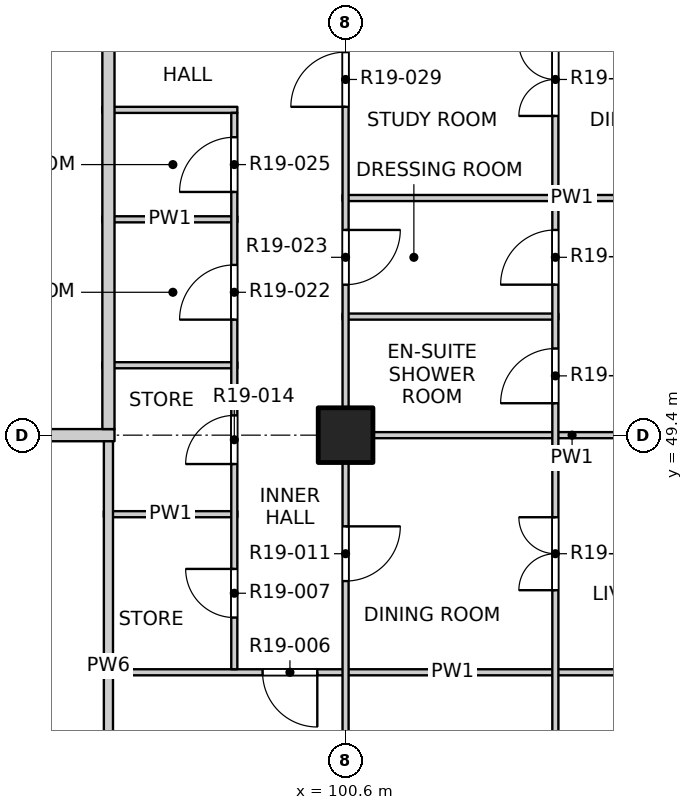
"""IFC4 building model, lengths in metres.
Left out: names, types, materials, properties, quantities, classifications, styles, units other than length and angle.
Written with IfcOpenShell. Run it as: python <this file> out.ifc"""

import sys

from ifc_helpers import new_model, si_unit, direction, frame, frame_2d, origin, origin_2d, place, context, subcontext, project, spatial, rectangle, extrude, element, fill, save


model = new_model("IFC4")
c1 = context("Model", 3, precision=1e-05, world=origin(), true_north=direction((0.0, 1.0)))
c2 = subcontext(c1, "Body", "Model", "MODEL_VIEW")
j1 = project(units=[si_unit("LENGTHUNIT", "METRE"), si_unit("PLANEANGLEUNIT", "RADIAN")], contexts=[c1])
p1 = place(None, origin())
s1 = spatial("IfcSite", under=j1, at=p1, CompositionType="ELEMENT")
p2 = place(p1, origin())
s2 = spatial("IfcBuilding", under=s1, at=p2, CompositionType="ELEMENT")
p3 = place(p2, frame((0.0, 0.0, 197.3)))
s3 = spatial("IfcBuildingStorey", under=s2, at=p3, CompositionType="ELEMENT", Elevation=197.3)
p4 = place(p3, frame((100.6, 49.4, -0.3), z_axis=(0.0, 0.0, 1.0), x_axis=(1.0, 0.0, 0.0)))
e1 = element("IfcColumn", 1, at=p4, inside=s3, PredefinedType="COLUMN", context=c2, shape_type="SweptSolid", body=[
    extrude(rectangle(XDim=0.9, YDim=0.9, at=origin_2d()), origin(), (0.0, 0.0, 1.0), 3.45),
])
p5 = place(p3, frame((96.625, 45.5, 0.0), z_axis=(0.0, 0.0, 1.0), x_axis=(1.0, 0.0, 0.0)))
e2 = element("IfcWall", 2, at=p5, inside=s3, PredefinedType="PARTITIONING", context=c2, shape_type="SweptSolid", body=[
    extrude(rectangle(XDim=11.475, YDim=0.1, at=frame_2d((5.738, 0.0))), origin(), (0.0, 0.0, 1.0), 3.15),
])
p6 = place(p5, frame((2.61, 0.0, 0.0)))
e3 = element("IfcOpeningElement", 3, at=p6, cuts=e2, PredefinedType="OPENING", context=c2, shape_type="SweptSolid", body=[
    extrude(rectangle(XDim=0.9, YDim=2.1, at=frame_2d((0.45, 1.05))), frame((0.0, 0.06, 0.0), z_axis=(0.0, -1.0, 0.0), x_axis=(1.0, 0.0, 0.0)), (0.0, 0.0, 1.0), 0.12),
])
p7 = place(p3, frame((96.625, 48.1, 0.0), z_axis=(0.0, 0.0, 1.0), x_axis=(1.0, 0.0, 0.0)))
e4 = element("IfcWall", 4, at=p7, inside=s3, PredefinedType="PARTITIONING", context=c2, shape_type="SweptSolid", body=[
    extrude(rectangle(XDim=2.195, YDim=0.1, at=frame_2d((1.098, 0.0))), origin(), (0.0, 0.0, 1.0), 3.15),
])
p8 = place(p3, frame((73.2, 49.4, 0.0), z_axis=(0.0, 0.0, 1.0), x_axis=(1.0, 0.0, 0.0)))
e5 = element("IfcWall", 5, at=p8, inside=s3, PredefinedType="PARTITIONING", context=c2, shape_type="SweptSolid", body=[
    extrude(rectangle(XDim=23.6, YDim=0.2, at=frame_2d((11.8, 0.0))), origin(), (0.0, 0.0, 1.0), 3.15),
])
p9 = place(p8, frame((2.25, 0.0, 0.0)))
e6 = element("IfcOpeningElement", 6, at=p9, cuts=e5, PredefinedType="OPENING", context=c2, shape_type="SweptSolid", body=[
    extrude(rectangle(XDim=1.2, YDim=2.1, at=frame_2d((0.6, 1.05))), frame((0.0, 0.11, 0.0), z_axis=(0.0, -1.0, 0.0), x_axis=(1.0, 0.0, 0.0)), (0.0, 0.0, 1.0), 0.22),
])
p10 = place(p8, frame((12.375, 0.0, 0.0)))
e7 = element("IfcOpeningElement", 7, at=p10, cuts=e5, PredefinedType="OPENING", context=c2, shape_type="SweptSolid", body=[
    extrude(rectangle(XDim=1.2, YDim=2.1, at=frame_2d((0.6, 1.05))), frame((0.0, 0.11, 0.0), z_axis=(0.0, -1.0, 0.0), x_axis=(1.0, 0.0, 0.0)), (0.0, 0.0, 1.0), 0.22),
])
p11 = place(p8, frame((20.15, 0.0, 0.0)))
e8 = element("IfcOpeningElement", 8, at=p11, cuts=e5, PredefinedType="OPENING", context=c2, shape_type="SweptSolid", body=[
    extrude(rectangle(XDim=1.2, YDim=2.1, at=frame_2d((0.6, 1.05))), frame((0.0, 0.11, 0.0), z_axis=(0.0, -1.0, 0.0), x_axis=(1.0, 0.0, 0.0)), (0.0, 0.0, 1.0), 0.22),
])
p12 = place(p3, frame((100.55, 49.4, 0.0), z_axis=(0.0, 0.0, 1.0), x_axis=(1.0, 0.0, 0.0)))
e9 = element("IfcWall", 9, at=p12, inside=s3, PredefinedType="PARTITIONING", context=c2, shape_type="SweptSolid", body=[
    extrude(rectangle(XDim=7.55, YDim=0.1, at=frame_2d((3.775, 0.0))), origin(), (0.0, 0.0, 1.0), 3.15),
])
p13 = place(p3, frame((96.6, 50.55, 0.0), z_axis=(0.0, 0.0, 1.0), x_axis=(1.0, 0.0, 0.0)))
e10 = element("IfcWall", 10, at=p13, inside=s3, PredefinedType="PARTITIONING", context=c2, shape_type="SweptSolid", body=[
    extrude(rectangle(XDim=2.22, YDim=0.1, at=frame_2d((1.11, 0.0))), origin(), (0.0, 0.0, 1.0), 3.15),
])
p14 = place(p3, frame((100.55, 51.35, 0.0), z_axis=(0.0, 0.0, 1.0), x_axis=(1.0, 0.0, 0.0)))
e11 = element("IfcWall", 11, at=p14, inside=s3, PredefinedType="PARTITIONING", context=c2, shape_type="SweptSolid", body=[
    extrude(rectangle(XDim=3.55, YDim=0.1, at=frame_2d((1.775, 0.0))), origin(), (0.0, 0.0, 1.0), 3.15),
])
p15 = place(p3, frame((96.6, 52.95, 0.0), z_axis=(0.0, 0.0, 1.0), x_axis=(1.0, 0.0, 0.0)))
e12 = element("IfcWall", 12, at=p15, inside=s3, PredefinedType="PARTITIONING", context=c2, shape_type="SweptSolid", body=[
    extrude(rectangle(XDim=2.22, YDim=0.1, at=frame_2d((1.11, 0.0))), origin(), (0.0, 0.0, 1.0), 3.15),
])
p16 = place(p3, frame((100.55, 53.3, 0.0), z_axis=(0.0, 0.0, 1.0), x_axis=(1.0, 0.0, 0.0)))
e13 = element("IfcWall", 13, at=p16, inside=s3, PredefinedType="PARTITIONING", context=c2, shape_type="SweptSolid", body=[
    extrude(rectangle(XDim=7.55, YDim=0.1, at=frame_2d((3.775, 0.0))), origin(), (0.0, 0.0, 1.0), 3.15),
])
p17 = place(p3, frame((96.6, 54.75, 0.0), z_axis=(0.0, 0.0, 1.0), x_axis=(1.0, 0.0, 0.0)))
e14 = element("IfcWall", 14, at=p17, inside=s3, PredefinedType="PARTITIONING", context=c2, shape_type="SweptSolid", body=[
    extrude(rectangle(XDim=2.22, YDim=0.1, at=frame_2d((1.11, 0.0))), origin(), (0.0, 0.0, 1.0), 3.15),
])
p18 = place(p3, frame((96.7, 41.9, 0.0), z_axis=(0.0, 0.0, 1.0), x_axis=(0.0, 1.0, 0.0)))
e15 = element("IfcWall", 15, at=p18, inside=s3, PredefinedType="PARTITIONING", context=c2, shape_type="SweptSolid", body=[
    extrude(rectangle(XDim=7.4, YDim=0.15, at=frame_2d((3.7, 0.0))), origin(), (0.0, 0.0, 1.0), 3.15),
])
p19 = place(p3, frame((96.7, 49.5, 0.0), z_axis=(0.0, 0.0, 1.0), x_axis=(0.0, 1.0, 0.0)))
e16 = element("IfcWall", 16, at=p19, inside=s3, PredefinedType="PARTITIONING", context=c2, shape_type="SweptSolid", body=[
    extrude(rectangle(XDim=34.9, YDim=0.2, at=frame_2d((17.45, 0.0))), origin(), (0.0, 0.0, 1.0), 3.15),
])
p20 = place(p19, frame((6.525, 0.0, 0.0)))
e17 = element("IfcOpeningElement", 17, at=p20, cuts=e16, PredefinedType="OPENING", context=c2, shape_type="SweptSolid", body=[
    extrude(rectangle(XDim=1.0, YDim=2.1, at=frame_2d((0.5, 1.05))), frame((0.0, 0.11, 0.0), z_axis=(0.0, -1.0, 0.0), x_axis=(1.0, 0.0, 0.0)), (0.0, 0.0, 1.0), 0.22),
])
p21 = place(p19, frame((14.275, 0.0, 0.0)))
e18 = element("IfcOpeningElement", 18, at=p21, cuts=e16, PredefinedType="OPENING", context=c2, shape_type="SweptSolid", body=[
    extrude(rectangle(XDim=1.0, YDim=2.1, at=frame_2d((0.5, 1.05))), frame((0.0, 0.11, 0.0), z_axis=(0.0, -1.0, 0.0), x_axis=(1.0, 0.0, 0.0)), (0.0, 0.0, 1.0), 0.22),
])
p22 = place(p19, frame((25.075, 0.0, 0.0)))
e19 = element("IfcOpeningElement", 19, at=p22, cuts=e16, PredefinedType="OPENING", context=c2, shape_type="SweptSolid", body=[
    extrude(rectangle(XDim=1.0, YDim=2.1, at=frame_2d((0.5, 1.05))), frame((0.0, 0.11, 0.0), z_axis=(0.0, -1.0, 0.0), x_axis=(1.0, 0.0, 0.0)), (0.0, 0.0, 1.0), 0.22),
])
p23 = place(p19, frame((30.475, 0.0, 0.0)))
e20 = element("IfcOpeningElement", 20, at=p23, cuts=e16, PredefinedType="OPENING", context=c2, shape_type="SweptSolid", body=[
    extrude(rectangle(XDim=1.0, YDim=2.1, at=frame_2d((0.5, 1.05))), frame((0.0, 0.11, 0.0), z_axis=(0.0, -1.0, 0.0), x_axis=(1.0, 0.0, 0.0)), (0.0, 0.0, 1.0), 0.22),
])
p24 = place(p3, frame((98.77, 45.55, 0.0), z_axis=(0.0, 0.0, 1.0), x_axis=(0.0, 1.0, 0.0)))
e21 = element("IfcWall", 21, at=p24, inside=s3, PredefinedType="PARTITIONING", context=c2, shape_type="SweptSolid", body=[
    extrude(rectangle(XDim=9.15, YDim=0.1, at=frame_2d((4.575, 0.0))), origin(), (0.0, 0.0, 1.0), 3.15),
])
p25 = place(p24, frame((0.85, 0.0, 0.0)))
e22 = element("IfcOpeningElement", 22, at=p25, cuts=e21, PredefinedType="OPENING", context=c2, shape_type="SweptSolid", body=[
    extrude(rectangle(XDim=0.8, YDim=2.1, at=frame_2d((0.4, 1.05))), frame((0.0, 0.06, 0.0), z_axis=(0.0, -1.0, 0.0), x_axis=(1.0, 0.0, 0.0)), (0.0, 0.0, 1.0), 0.12),
])
p26 = place(p24, frame((3.375, 0.0, 0.0)))
e23 = element("IfcOpeningElement", 23, at=p26, cuts=e21, PredefinedType="OPENING", context=c2, shape_type="SweptSolid", body=[
    extrude(rectangle(XDim=0.8, YDim=2.1, at=frame_2d((0.4, 1.05))), frame((0.0, 0.06, 0.0), z_axis=(0.0, -1.0, 0.0), x_axis=(1.0, 0.0, 0.0)), (0.0, 0.0, 1.0), 0.12),
])
p27 = place(p24, frame((5.75, 0.0, 0.0)))
e24 = element("IfcOpeningElement", 24, at=p27, cuts=e21, PredefinedType="OPENING", context=c2, shape_type="SweptSolid", body=[
    extrude(rectangle(XDim=0.9, YDim=2.1, at=frame_2d((0.45, 1.05))), frame((0.0, 0.06, 0.0), z_axis=(0.0, -1.0, 0.0), x_axis=(1.0, 0.0, 0.0)), (0.0, 0.0, 1.0), 0.12),
])
p28 = place(p24, frame((7.85, 0.0, 0.0)))
e25 = element("IfcOpeningElement", 25, at=p28, cuts=e21, PredefinedType="OPENING", context=c2, shape_type="SweptSolid", body=[
    extrude(rectangle(XDim=0.9, YDim=2.1, at=frame_2d((0.45, 1.05))), frame((0.0, 0.06, 0.0), z_axis=(0.0, -1.0, 0.0), x_axis=(1.0, 0.0, 0.0)), (0.0, 0.0, 1.0), 0.12),
])
p29 = place(p3, frame((100.6, 41.9, 0.0), z_axis=(0.0, 0.0, 1.0), x_axis=(0.0, 1.0, 0.0)))
e26 = element("IfcWall", 26, at=p29, inside=s3, PredefinedType="PARTITIONING", context=c2, shape_type="SweptSolid", body=[
    extrude(rectangle(XDim=46.2, YDim=0.1, at=frame_2d((23.1, 0.0))), origin(), (0.0, 0.0, 1.0), 3.15),
])
p30 = place(p29, frame((1.2, 0.0, 0.0)))
e27 = element("IfcOpeningElement", 27, at=p30, cuts=e26, PredefinedType="OPENING", context=c2, shape_type="SweptSolid", body=[
    extrude(rectangle(XDim=0.9, YDim=2.1, at=frame_2d((0.45, 1.05))), frame((0.0, 0.06, 0.0), z_axis=(0.0, -1.0, 0.0), x_axis=(1.0, 0.0, 0.0)), (0.0, 0.0, 1.0), 0.12),
])
p31 = place(p29, frame((5.1, 0.0, 0.0)))
e28 = element("IfcOpeningElement", 28, at=p31, cuts=e26, PredefinedType="OPENING", context=c2, shape_type="SweptSolid", body=[
    extrude(rectangle(XDim=0.9, YDim=2.1, at=frame_2d((0.45, 1.05))), frame((0.0, 0.06, 0.0), z_axis=(0.0, -1.0, 0.0), x_axis=(1.0, 0.0, 0.0)), (0.0, 0.0, 1.0), 0.12),
])
p32 = place(p29, frame((9.975, 0.0, 0.0)))
e29 = element("IfcOpeningElement", 29, at=p32, cuts=e26, PredefinedType="OPENING", context=c2, shape_type="SweptSolid", body=[
    extrude(rectangle(XDim=0.9, YDim=2.1, at=frame_2d((0.45, 1.05))), frame((0.0, 0.06, 0.0), z_axis=(0.0, -1.0, 0.0), x_axis=(1.0, 0.0, 0.0)), (0.0, 0.0, 1.0), 0.12),
])
p33 = place(p29, frame((12.9, 0.0, 0.0)))
e30 = element("IfcOpeningElement", 30, at=p33, cuts=e26, PredefinedType="OPENING", context=c2, shape_type="SweptSolid", body=[
    extrude(rectangle(XDim=0.9, YDim=2.1, at=frame_2d((0.45, 1.05))), frame((0.0, 0.06, 0.0), z_axis=(0.0, -1.0, 0.0), x_axis=(1.0, 0.0, 0.0)), (0.0, 0.0, 1.0), 0.12),
])
p34 = place(p29, frame((17.775, 0.0, 0.0)))
e31 = element("IfcOpeningElement", 31, at=p34, cuts=e26, PredefinedType="OPENING", context=c2, shape_type="SweptSolid", body=[
    extrude(rectangle(XDim=0.9, YDim=2.1, at=frame_2d((0.45, 1.05))), frame((0.0, 0.06, 0.0), z_axis=(0.0, -1.0, 0.0), x_axis=(1.0, 0.0, 0.0)), (0.0, 0.0, 1.0), 0.12),
])
p35 = place(p29, frame((20.7, 0.0, 0.0)))
e32 = element("IfcOpeningElement", 32, at=p35, cuts=e26, PredefinedType="OPENING", context=c2, shape_type="SweptSolid", body=[
    extrude(rectangle(XDim=0.9, YDim=2.1, at=frame_2d((0.45, 1.05))), frame((0.0, 0.06, 0.0), z_axis=(0.0, -1.0, 0.0), x_axis=(1.0, 0.0, 0.0)), (0.0, 0.0, 1.0), 0.12),
])
p36 = place(p29, frame((25.575, 0.0, 0.0)))
e33 = element("IfcOpeningElement", 33, at=p36, cuts=e26, PredefinedType="OPENING", context=c2, shape_type="SweptSolid", body=[
    extrude(rectangle(XDim=0.9, YDim=2.1, at=frame_2d((0.45, 1.05))), frame((0.0, 0.06, 0.0), z_axis=(0.0, -1.0, 0.0), x_axis=(1.0, 0.0, 0.0)), (0.0, 0.0, 1.0), 0.12),
])
p37 = place(p29, frame((28.5, 0.0, 0.0)))
e34 = element("IfcOpeningElement", 34, at=p37, cuts=e26, PredefinedType="OPENING", context=c2, shape_type="SweptSolid", body=[
    extrude(rectangle(XDim=0.9, YDim=2.1, at=frame_2d((0.45, 1.05))), frame((0.0, 0.06, 0.0), z_axis=(0.0, -1.0, 0.0), x_axis=(1.0, 0.0, 0.0)), (0.0, 0.0, 1.0), 0.12),
])
p38 = place(p29, frame((33.375, 0.0, 0.0)))
e35 = element("IfcOpeningElement", 35, at=p38, cuts=e26, PredefinedType="OPENING", context=c2, shape_type="SweptSolid", body=[
    extrude(rectangle(XDim=0.9, YDim=2.1, at=frame_2d((0.45, 1.05))), frame((0.0, 0.06, 0.0), z_axis=(0.0, -1.0, 0.0), x_axis=(1.0, 0.0, 0.0)), (0.0, 0.0, 1.0), 0.12),
])
p39 = place(p29, frame((37.225, 0.0, 0.0)))
e36 = element("IfcOpeningElement", 36, at=p39, cuts=e26, PredefinedType="OPENING", context=c2, shape_type="SweptSolid", body=[
    extrude(rectangle(XDim=0.9, YDim=2.1, at=frame_2d((0.45, 1.05))), frame((0.0, 0.06, 0.0), z_axis=(0.0, -1.0, 0.0), x_axis=(1.0, 0.0, 0.0)), (0.0, 0.0, 1.0), 0.12),
])
p40 = place(p29, frame((41.175, 0.0, 0.0)))
e37 = element("IfcOpeningElement", 37, at=p40, cuts=e26, PredefinedType="OPENING", context=c2, shape_type="SweptSolid", body=[
    extrude(rectangle(XDim=0.9, YDim=2.1, at=frame_2d((0.45, 1.05))), frame((0.0, 0.06, 0.0), z_axis=(0.0, -1.0, 0.0), x_axis=(1.0, 0.0, 0.0)), (0.0, 0.0, 1.0), 0.12),
])
p41 = place(p29, frame((44.1, 0.0, 0.0)))
e38 = element("IfcOpeningElement", 38, at=p41, cuts=e26, PredefinedType="OPENING", context=c2, shape_type="SweptSolid", body=[
    extrude(rectangle(XDim=0.9, YDim=2.1, at=frame_2d((0.45, 1.05))), frame((0.0, 0.06, 0.0), z_axis=(0.0, -1.0, 0.0), x_axis=(1.0, 0.0, 0.0)), (0.0, 0.0, 1.0), 0.12),
])
p42 = place(p3, frame((104.05, 41.9, 0.0), z_axis=(0.0, 0.0, 1.0), x_axis=(0.0, 1.0, 0.0)))
e39 = element("IfcWall", 39, at=p42, inside=s3, PredefinedType="PARTITIONING", context=c2, shape_type="SweptSolid", body=[
    extrude(rectangle(XDim=26.9, YDim=0.1, at=frame_2d((13.45, 0.0))), origin(), (0.0, 0.0, 1.0), 3.15),
])
p43 = place(p42, frame((1.05, 0.0, 0.0)))
e40 = element("IfcOpeningElement", 40, at=p43, cuts=e39, PredefinedType="OPENING", context=c2, shape_type="SweptSolid", body=[
    extrude(rectangle(XDim=1.2, YDim=2.1, at=frame_2d((0.6, 1.05))), frame((0.0, 0.06, 0.0), z_axis=(0.0, -1.0, 0.0), x_axis=(1.0, 0.0, 0.0)), (0.0, 0.0, 1.0), 0.12),
])
p44 = place(p42, frame((4.95, 0.0, 0.0)))
e41 = element("IfcOpeningElement", 41, at=p44, cuts=e39, PredefinedType="OPENING", context=c2, shape_type="SweptSolid", body=[
    extrude(rectangle(XDim=1.2, YDim=2.1, at=frame_2d((0.6, 1.05))), frame((0.0, 0.06, 0.0), z_axis=(0.0, -1.0, 0.0), x_axis=(1.0, 0.0, 0.0)), (0.0, 0.0, 1.0), 0.12),
])
p45 = place(p42, frame((8.025, 0.0, 0.0)))
e42 = element("IfcOpeningElement", 42, at=p45, cuts=e39, PredefinedType="OPENING", context=c2, shape_type="SweptSolid", body=[
    extrude(rectangle(XDim=0.9, YDim=2.1, at=frame_2d((0.45, 1.05))), frame((0.0, 0.06, 0.0), z_axis=(0.0, -1.0, 0.0), x_axis=(1.0, 0.0, 0.0)), (0.0, 0.0, 1.0), 0.12),
])
p46 = place(p42, frame((9.975, 0.0, 0.0)))
e43 = element("IfcOpeningElement", 43, at=p46, cuts=e39, PredefinedType="OPENING", context=c2, shape_type="SweptSolid", body=[
    extrude(rectangle(XDim=0.9, YDim=2.1, at=frame_2d((0.45, 1.05))), frame((0.0, 0.06, 0.0), z_axis=(0.0, -1.0, 0.0), x_axis=(1.0, 0.0, 0.0)), (0.0, 0.0, 1.0), 0.12),
])
p47 = place(p42, frame((12.75, 0.0, 0.0)))
e44 = element("IfcOpeningElement", 44, at=p47, cuts=e39, PredefinedType="OPENING", context=c2, shape_type="SweptSolid", body=[
    extrude(rectangle(XDim=1.2, YDim=2.1, at=frame_2d((0.6, 1.05))), frame((0.0, 0.06, 0.0), z_axis=(0.0, -1.0, 0.0), x_axis=(1.0, 0.0, 0.0)), (0.0, 0.0, 1.0), 0.12),
])
p48 = place(p42, frame((15.825, 0.0, 0.0)))
e45 = element("IfcOpeningElement", 45, at=p48, cuts=e39, PredefinedType="OPENING", context=c2, shape_type="SweptSolid", body=[
    extrude(rectangle(XDim=0.9, YDim=2.1, at=frame_2d((0.45, 1.05))), frame((0.0, 0.06, 0.0), z_axis=(0.0, -1.0, 0.0), x_axis=(1.0, 0.0, 0.0)), (0.0, 0.0, 1.0), 0.12),
])
p49 = place(p42, frame((17.775, 0.0, 0.0)))
e46 = element("IfcOpeningElement", 46, at=p49, cuts=e39, PredefinedType="OPENING", context=c2, shape_type="SweptSolid", body=[
    extrude(rectangle(XDim=0.9, YDim=2.1, at=frame_2d((0.45, 1.05))), frame((0.0, 0.06, 0.0), z_axis=(0.0, -1.0, 0.0), x_axis=(1.0, 0.0, 0.0)), (0.0, 0.0, 1.0), 0.12),
])
p50 = place(p42, frame((20.55, 0.0, 0.0)))
e47 = element("IfcOpeningElement", 47, at=p50, cuts=e39, PredefinedType="OPENING", context=c2, shape_type="SweptSolid", body=[
    extrude(rectangle(XDim=1.2, YDim=2.1, at=frame_2d((0.6, 1.05))), frame((0.0, 0.06, 0.0), z_axis=(0.0, -1.0, 0.0), x_axis=(1.0, 0.0, 0.0)), (0.0, 0.0, 1.0), 0.12),
])
p51 = place(p42, frame((23.625, 0.0, 0.0)))
e48 = element("IfcOpeningElement", 48, at=p51, cuts=e39, PredefinedType="OPENING", context=c2, shape_type="SweptSolid", body=[
    extrude(rectangle(XDim=0.9, YDim=2.1, at=frame_2d((0.45, 1.05))), frame((0.0, 0.06, 0.0), z_axis=(0.0, -1.0, 0.0), x_axis=(1.0, 0.0, 0.0)), (0.0, 0.0, 1.0), 0.12),
])
p52 = place(p42, frame((25.575, 0.0, 0.0)))
e49 = element("IfcOpeningElement", 49, at=p52, cuts=e39, PredefinedType="OPENING", context=c2, shape_type="SweptSolid", body=[
    extrude(rectangle(XDim=0.9, YDim=2.1, at=frame_2d((0.45, 1.05))), frame((0.0, 0.06, 0.0), z_axis=(0.0, -1.0, 0.0), x_axis=(1.0, 0.0, 0.0)), (0.0, 0.0, 1.0), 0.12),
])
p53 = place(p6, origin())
e50 = element("IfcDoor", 50, at=p53, inside=s3, OperationType="SINGLE_SWING_LEFT", PredefinedType="DOOR", context=c2, shape_type="SweptSolid", body=[
    extrude(rectangle(XDim=0.9, YDim=2.1, at=frame_2d((0.45, 1.05))), frame((0.0, 0.025, 0.0), z_axis=(0.0, -1.0, 0.0), x_axis=(1.0, 0.0, 0.0)), (0.0, 0.0, 1.0), 0.05),
])
fill(e3, e50)
p54 = place(p25, origin())
e51 = element("IfcDoor", 51, at=p54, inside=s3, OperationType="SINGLE_SWING_RIGHT", PredefinedType="DOOR", context=c2, shape_type="SweptSolid", body=[
    extrude(rectangle(XDim=0.8, YDim=2.1, at=frame_2d((0.4, 1.05))), frame((0.0, 0.025, 0.0), z_axis=(0.0, -1.0, 0.0), x_axis=(1.0, 0.0, 0.0)), (0.0, 0.0, 1.0), 0.05),
])
fill(e22, e51)
p55 = place(p31, origin())
e52 = element("IfcDoor", 52, at=p55, inside=s3, OperationType="SINGLE_SWING_LEFT", PredefinedType="DOOR", context=c2, shape_type="SweptSolid", body=[
    extrude(rectangle(XDim=0.9, YDim=2.1, at=frame_2d((0.45, 1.05))), frame((0.0, 0.025, 0.0), z_axis=(0.0, -1.0, 0.0), x_axis=(1.0, 0.0, 0.0)), (0.0, 0.0, 1.0), 0.05),
])
fill(e28, e52)
p56 = place(p44, origin())
e53 = element("IfcDoor", 53, at=p56, inside=s3, OperationType="DOUBLE_DOOR_SINGLE_SWING", PredefinedType="DOOR", context=c2, shape_type="SweptSolid", body=[
    extrude(rectangle(XDim=1.2, YDim=2.1, at=frame_2d((0.6, 1.05))), frame((0.0, 0.025, 0.0), z_axis=(0.0, -1.0, 0.0), x_axis=(1.0, 0.0, 0.0)), (0.0, 0.0, 1.0), 0.05),
])
fill(e41, e53)
p57 = place(p26, origin())
e54 = element("IfcDoor", 54, at=p57, inside=s3, OperationType="SINGLE_SWING_LEFT", PredefinedType="DOOR", context=c2, shape_type="SweptSolid", body=[
    extrude(rectangle(XDim=0.8, YDim=2.1, at=frame_2d((0.4, 1.05))), frame((0.0, 0.025, 0.0), z_axis=(0.0, -1.0, 0.0), x_axis=(1.0, 0.0, 0.0)), (0.0, 0.0, 1.0), 0.05),
])
fill(e23, e54)
p58 = place(p45, origin())
e55 = element("IfcDoor", 55, at=p58, inside=s3, OperationType="SINGLE_SWING_LEFT", PredefinedType="DOOR", context=c2, shape_type="SweptSolid", body=[
    extrude(rectangle(XDim=0.9, YDim=2.1, at=frame_2d((0.45, 1.05))), frame((0.0, 0.025, 0.0), z_axis=(0.0, -1.0, 0.0), x_axis=(1.0, 0.0, 0.0)), (0.0, 0.0, 1.0), 0.05),
])
fill(e42, e55)
p59 = place(p27, origin())
e56 = element("IfcDoor", 56, at=p59, inside=s3, OperationType="SINGLE_SWING_LEFT", PredefinedType="DOOR", context=c2, shape_type="SweptSolid", body=[
    extrude(rectangle(XDim=0.9, YDim=2.1, at=frame_2d((0.45, 1.05))), frame((0.0, 0.025, 0.0), z_axis=(0.0, -1.0, 0.0), x_axis=(1.0, 0.0, 0.0)), (0.0, 0.0, 1.0), 0.05),
])
fill(e24, e56)
p60 = place(p32, origin())
e57 = element("IfcDoor", 57, at=p60, inside=s3, OperationType="SINGLE_SWING_LEFT", PredefinedType="DOOR", context=c2, shape_type="SweptSolid", body=[
    extrude(rectangle(XDim=0.9, YDim=2.1, at=frame_2d((0.45, 1.05))), frame((0.0, 0.025, 0.0), z_axis=(0.0, -1.0, 0.0), x_axis=(1.0, 0.0, 0.0)), (0.0, 0.0, 1.0), 0.05),
])
fill(e29, e57)
p61 = place(p46, origin())
e58 = element("IfcDoor", 58, at=p61, inside=s3, OperationType="SINGLE_SWING_LEFT", PredefinedType="DOOR", context=c2, shape_type="SweptSolid", body=[
    extrude(rectangle(XDim=0.9, YDim=2.1, at=frame_2d((0.45, 1.05))), frame((0.0, 0.025, 0.0), z_axis=(0.0, -1.0, 0.0), x_axis=(1.0, 0.0, 0.0)), (0.0, 0.0, 1.0), 0.05),
])
fill(e43, e58)
p62 = place(p28, origin())
e59 = element("IfcDoor", 59, at=p62, inside=s3, OperationType="SINGLE_SWING_LEFT", PredefinedType="DOOR", context=c2, shape_type="SweptSolid", body=[
    extrude(rectangle(XDim=0.9, YDim=2.1, at=frame_2d((0.45, 1.05))), frame((0.0, 0.025, 0.0), z_axis=(0.0, -1.0, 0.0), x_axis=(1.0, 0.0, 0.0)), (0.0, 0.0, 1.0), 0.05),
])
fill(e25, e59)
p63 = place(p33, origin())
e60 = element("IfcDoor", 60, at=p63, inside=s3, OperationType="SINGLE_SWING_LEFT", PredefinedType="DOOR", context=c2, shape_type="SweptSolid", body=[
    extrude(rectangle(XDim=0.9, YDim=2.1, at=frame_2d((0.45, 1.05))), frame((0.0, 0.025, 0.0), z_axis=(0.0, -1.0, 0.0), x_axis=(1.0, 0.0, 0.0)), (0.0, 0.0, 1.0), 0.05),
])
fill(e30, e60)
p64 = place(p47, origin())
e61 = element("IfcDoor", 61, at=p64, inside=s3, OperationType="DOUBLE_DOOR_SINGLE_SWING", PredefinedType="DOOR", context=c2, shape_type="SweptSolid", body=[
    extrude(rectangle(XDim=1.2, YDim=2.1, at=frame_2d((0.6, 1.05))), frame((0.0, 0.025, 0.0), z_axis=(0.0, -1.0, 0.0), x_axis=(1.0, 0.0, 0.0)), (0.0, 0.0, 1.0), 0.05),
])
fill(e44, e61)
save(model, sys.argv[1])
